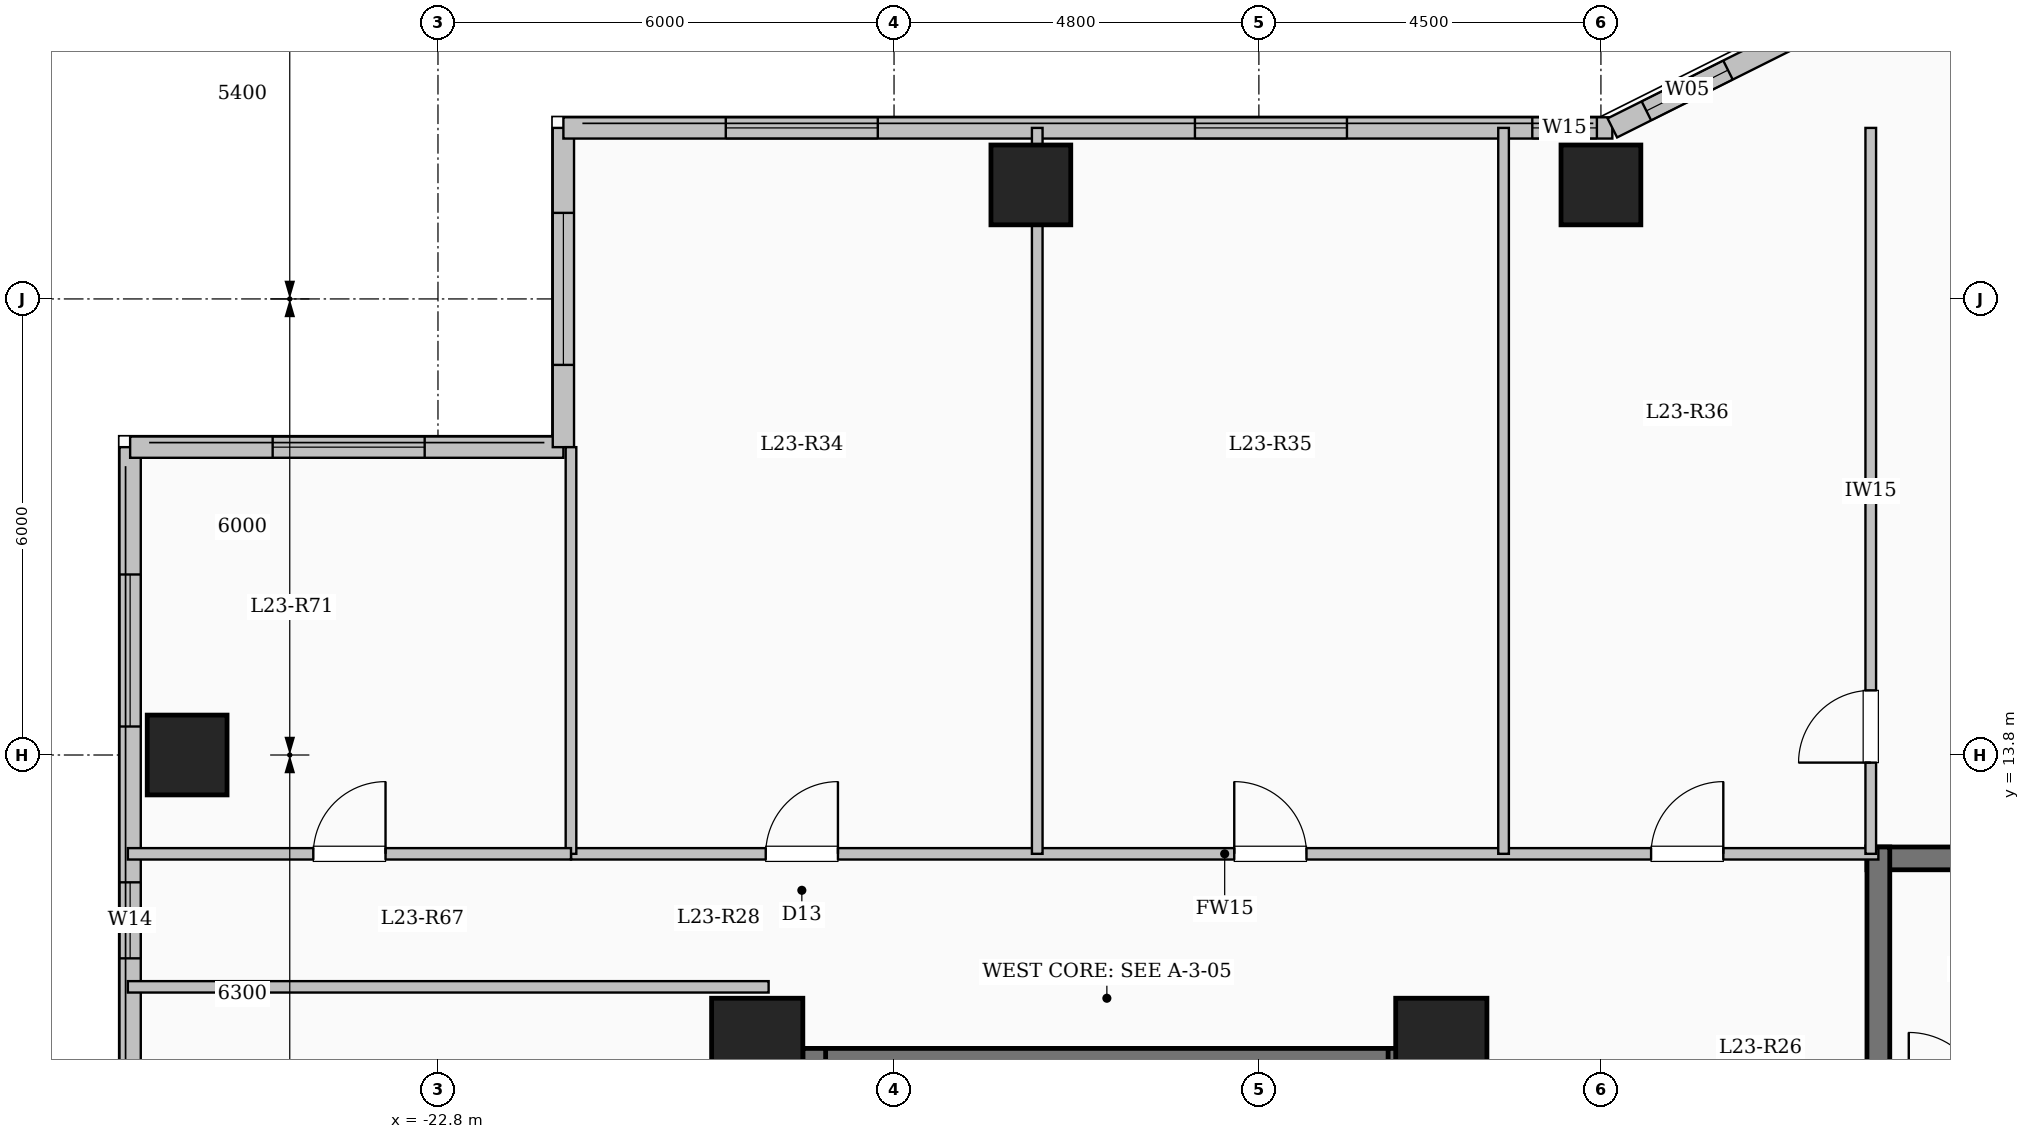
"""IFC4 building model, lengths in metres.
Left out: names, types, materials, properties, quantities, classifications, styles, units other than length and angle.
Written with IfcOpenShell. Run it as: python <this file> out.ifc"""

import sys

from ifc_helpers import new_model, si_unit, direction, frame, frame_2d, origin, origin_2d, place, context, subcontext, project, spatial, rectangle, extrude, element, fill, save


model = new_model("IFC4")
c1 = context("Model", 3, precision=1e-05, world=origin(), true_north=direction((0.0, 1.0)))
c2 = subcontext(c1, "Body", "Model", "MODEL_VIEW")
j1 = project(units=[si_unit("LENGTHUNIT", "METRE"), si_unit("PLANEANGLEUNIT", "RADIAN")], contexts=[c1])
p1 = place(None, origin())
s1 = spatial("IfcSite", under=j1, at=p1, CompositionType="ELEMENT")
p2 = place(p1, origin())
s2 = spatial("IfcBuilding", under=s1, at=p2, CompositionType="ELEMENT")
p3 = place(p2, frame((0.0, 0.0, 88.35)))
s3 = spatial("IfcBuildingStorey", under=s2, at=p3, CompositionType="ELEMENT", Elevation=88.35)
for number, where, z_axis, x_axis in (
    (1, (-9.6, 10.0, 0.0), (0.0, 0.0, 1.0), (1.0, 0.0, 0.0)),
    (2, (-18.6, 10.0, 0.0), (0.0, 0.0, 1.0), (1.0, 0.0, 0.0)),
):
    element("IfcColumn", number, at=place(p3, frame(where, z_axis=z_axis, x_axis=x_axis)), inside=s3, PredefinedType="COLUMN", context=c2, shape_type="SweptSolid", body=[
        extrude(rectangle(XDim=1.2, YDim=1.2, at=origin_2d()), origin(), (0.0, 0.0, 1.0), 3.35),
    ])
for number, where, z_axis, x_axis in (
    (3, (-15.0, 21.3, 0.0), (0.0, 0.0, 1.0), (1.0, 0.0, 0.0)),
    (4, (-7.5, 21.3, 0.0), (0.0, 0.0, 1.0), (1.0, 0.0, 0.0)),
    (5, (-26.1, 13.8, 0.0), (0.0, 0.0, 1.0), (1.0, 0.0, 0.0)),
):
    element("IfcColumn", number, at=place(p3, frame(where, z_axis=z_axis, x_axis=x_axis)), inside=s3, PredefinedType="COLUMN", context=c2, shape_type="SweptSolid", body=[
        extrude(rectangle(XDim=1.05, YDim=1.05, at=origin_2d()), origin(), (0.0, 0.0, 1.0), 3.35),
    ])
p4 = place(p3, frame((-26.85, -17.85, 0.0), z_axis=(0.0, 0.0, 1.0), x_axis=(0.0, 1.0, 0.0)))
e6 = element("IfcWall", 6, at=p4, inside=s3, PredefinedType="SOLIDWALL", context=c2, shape_type="SweptSolid", body=[
    extrude(rectangle(XDim=35.7, YDim=0.28, at=frame_2d((17.85, 0.0))), origin(), (0.0, 0.0, 1.0), 3.1),
])
p5 = place(p4, frame((2.55, 0.0, 0.9)))
e7 = element("IfcOpeningElement", 7, at=p5, cuts=e6, PredefinedType="OPENING", context=c2, shape_type="SweptSolid", body=[
    extrude(rectangle(XDim=2.4, YDim=1.8, at=frame_2d((1.2, 0.9))), frame((0.0, 0.15, 0.0), z_axis=(0.0, -1.0, 0.0), x_axis=(1.0, 0.0, 0.0)), (0.0, 0.0, 1.0), 0.3),
])
p6 = place(p4, frame((8.343, 0.0, 0.9)))
e8 = element("IfcOpeningElement", 8, at=p6, cuts=e6, PredefinedType="OPENING", context=c2, shape_type="SweptSolid", body=[
    extrude(rectangle(XDim=1.5, YDim=1.65, at=frame_2d((0.75, 0.825))), frame((0.0, 0.15, 0.0), z_axis=(0.0, -1.0, 0.0), x_axis=(1.0, 0.0, 0.0)), (0.0, 0.0, 1.0), 0.3),
])
p7 = place(p4, frame((18.6, 0.0, 0.9)))
e9 = element("IfcOpeningElement", 9, at=p7, cuts=e6, PredefinedType="OPENING", context=c2, shape_type="SweptSolid", body=[
    extrude(rectangle(XDim=2.0, YDim=1.7, at=frame_2d((1.0, 0.85))), frame((0.0, 0.15, 0.0), z_axis=(0.0, -1.0, 0.0), x_axis=(1.0, 0.0, 0.0)), (0.0, 0.0, 1.0), 0.3),
])
p8 = place(p4, frame((28.975, 0.0, 0.95)))
e10 = element("IfcOpeningElement", 10, at=p8, cuts=e6, PredefinedType="OPENING", context=c2, shape_type="SweptSolid", body=[
    extrude(rectangle(XDim=1.0, YDim=1.5, at=frame_2d((0.5, 0.75))), frame((0.0, 0.15, 0.0), z_axis=(0.0, -1.0, 0.0), x_axis=(1.0, 0.0, 0.0)), (0.0, 0.0, 1.0), 0.3),
])
p9 = place(p4, frame((32.025, 0.0, 0.9)))
e11 = element("IfcOpeningElement", 11, at=p9, cuts=e6, PredefinedType="OPENING", context=c2, shape_type="SweptSolid", body=[
    extrude(rectangle(XDim=2.0, YDim=1.7, at=frame_2d((1.0, 0.85))), frame((0.0, 0.15, 0.0), z_axis=(0.0, -1.0, 0.0), x_axis=(1.0, 0.0, 0.0)), (0.0, 0.0, 1.0), 0.3),
])
p10 = place(p3, frame((-26.85, 17.85, 0.0), z_axis=(0.0, 0.0, 1.0), x_axis=(1.0, 0.0, 0.0)))
e12 = element("IfcWall", 12, at=p10, inside=s3, PredefinedType="SOLIDWALL", context=c2, shape_type="SweptSolid", body=[
    extrude(rectangle(XDim=5.7, YDim=0.28, at=frame_2d((2.85, 0.0))), origin(), (0.0, 0.0, 1.0), 3.1),
])
p11 = place(p10, frame((1.875, 0.0, 0.9)))
e13 = element("IfcOpeningElement", 13, at=p11, cuts=e12, PredefinedType="OPENING", context=c2, shape_type="SweptSolid", body=[
    extrude(rectangle(XDim=2.0, YDim=1.7, at=frame_2d((1.0, 0.85))), frame((0.0, 0.15, 0.0), z_axis=(0.0, -1.0, 0.0), x_axis=(1.0, 0.0, 0.0)), (0.0, 0.0, 1.0), 0.3),
])
p12 = place(p3, frame((-21.15, 17.85, 0.0), z_axis=(0.0, 0.0, 1.0), x_axis=(0.0, 1.0, 0.0)))
e14 = element("IfcWall", 14, at=p12, inside=s3, PredefinedType="SOLIDWALL", context=c2, shape_type="SweptSolid", body=[
    extrude(rectangle(XDim=4.2, YDim=0.28, at=frame_2d((2.1, 0.0))), origin(), (0.0, 0.0, 1.0), 3.1),
])
p13 = place(p12, frame((1.082, 0.0, 0.9)))
e15 = element("IfcOpeningElement", 15, at=p13, cuts=e14, PredefinedType="OPENING", context=c2, shape_type="SweptSolid", body=[
    extrude(rectangle(XDim=2.0, YDim=1.7, at=frame_2d((1.0, 0.85))), frame((0.0, 0.15, 0.0), z_axis=(0.0, -1.0, 0.0), x_axis=(1.0, 0.0, 0.0)), (0.0, 0.0, 1.0), 0.3),
])
p14 = place(p3, frame((-21.15, 22.05, 0.0), z_axis=(0.0, 0.0, 1.0), x_axis=(1.0, 0.0, 0.0)))
e16 = element("IfcWall", 16, at=p14, inside=s3, PredefinedType="SOLIDWALL", context=c2, shape_type="SweptSolid", body=[
    extrude(rectangle(XDim=13.8, YDim=0.28, at=frame_2d((6.9, 0.0))), origin(), (0.0, 0.0, 1.0), 3.1),
])
p15 = place(p14, frame((2.136, 0.0, 0.9)))
e17 = element("IfcOpeningElement", 17, at=p15, cuts=e16, PredefinedType="OPENING", context=c2, shape_type="SweptSolid", body=[
    extrude(rectangle(XDim=2.0, YDim=1.7, at=frame_2d((1.0, 0.85))), frame((0.0, 0.15, 0.0), z_axis=(0.0, -1.0, 0.0), x_axis=(1.0, 0.0, 0.0)), (0.0, 0.0, 1.0), 0.3),
])
p16 = place(p14, frame((8.309, 0.0, 0.9)))
e18 = element("IfcOpeningElement", 18, at=p16, cuts=e16, PredefinedType="OPENING", context=c2, shape_type="SweptSolid", body=[
    extrude(rectangle(XDim=2.0, YDim=1.7, at=frame_2d((1.0, 0.85))), frame((0.0, 0.15, 0.0), z_axis=(0.0, -1.0, 0.0), x_axis=(1.0, 0.0, 0.0)), (0.0, 0.0, 1.0), 0.3),
])
p17 = place(p14, frame((12.747, 0.0, 0.95)))
e19 = element("IfcOpeningElement", 19, at=p17, cuts=e16, PredefinedType="OPENING", context=c2, shape_type="SweptSolid", body=[
    extrude(rectangle(XDim=0.85, YDim=1.5, at=frame_2d((0.425, 0.75))), frame((0.0, 0.15, 0.0), z_axis=(0.0, -1.0, 0.0), x_axis=(1.0, 0.0, 0.0)), (0.0, 0.0, 1.0), 0.3),
])
p18 = place(p3, frame((-7.35, 22.05, 0.0), z_axis=(0.0, 0.0, 1.0), x_axis=(0.894427191, 0.4472135955, 0.0)))
e20 = element("IfcWall", 20, at=p18, inside=s3, PredefinedType="SOLIDWALL", context=c2, shape_type="SweptSolid", body=[
    extrude(rectangle(XDim=3.354, YDim=0.28, at=frame_2d((1.677, 0.0))), origin(), (0.0, 0.0, 1.0), 3.1),
])
p19 = place(p18, frame((0.501, 0.0, 0.95)))
e21 = element("IfcOpeningElement", 21, at=p19, cuts=e20, PredefinedType="OPENING", context=c2, shape_type="SweptSolid", body=[
    extrude(rectangle(XDim=1.2, YDim=1.5, at=frame_2d((0.6, 0.75))), frame((0.0, 0.15, 0.0), z_axis=(0.0, -1.0, 0.0), x_axis=(1.0, 0.0, 0.0)), (0.0, 0.0, 1.0), 0.3),
])
p20 = place(p3, frame((-18.0, 9.79, 0.0), z_axis=(0.0, 0.0, 1.0), x_axis=(1.0, 0.0, 0.0)))
e22 = element("IfcWall", 22, at=p20, inside=s3, PredefinedType="SHEAR", context=c2, shape_type="SweptSolid", body=[
    extrude(rectangle(XDim=8.0, YDim=0.3, at=frame_2d((4.0, 0.0))), origin(), (0.0, 0.0, 1.0), 3.35),
])
for number, where, z_axis, x_axis in (
    (23, (-17.85, 6.35, 0.0), (0.0, 0.0, 1.0), (0.0, 1.0, 0.0)),
    (24, (-10.15, 6.35, 0.0), (0.0, 0.0, 1.0), (0.0, 1.0, 0.0)),
):
    element("IfcWall", number, at=place(p3, frame(where, z_axis=z_axis, x_axis=x_axis)), inside=s3, PredefinedType="SHEAR", context=c2, shape_type="SweptSolid", body=[
        extrude(rectangle(XDim=3.59, YDim=0.3, at=frame_2d((1.795, 0.0))), origin(), (0.0, 0.0, 1.0), 3.35),
    ])
p21 = place(p3, frame((-4.0, 12.44, 0.0), z_axis=(0.0, 0.0, 1.0), x_axis=(1.0, 0.0, 0.0)))
e25 = element("IfcWall", 25, at=p21, inside=s3, PredefinedType="SHEAR", context=c2, shape_type="SweptSolid", body=[
    extrude(rectangle(XDim=8.0, YDim=0.3, at=frame_2d((4.0, 0.0))), origin(), (0.0, 0.0, 1.0), 3.35),
])
p22 = place(p3, frame((-3.85, 9.0, 0.0), z_axis=(0.0, 0.0, 1.0), x_axis=(0.0, 1.0, 0.0)))
e26 = element("IfcWall", 26, at=p22, inside=s3, PredefinedType="SHEAR", context=c2, shape_type="SweptSolid", body=[
    extrude(rectangle(XDim=3.59, YDim=0.3, at=frame_2d((1.795, 0.0))), origin(), (0.0, 0.0, 1.0), 3.35),
])
p23 = place(p3, frame((-21.05, 12.5, 0.0), z_axis=(0.0, 0.0, 1.0), x_axis=(1.0, 0.0, 0.0)))
e27 = element("IfcWall", 27, at=p23, inside=s3, PredefinedType="PARTITIONING", context=c2, shape_type="SweptSolid", body=[
    extrude(rectangle(XDim=17.2, YDim=0.15, at=frame_2d((8.6, 0.0))), origin(), (0.0, 0.0, 1.0), 3.1),
])
p24 = place(p23, frame((2.562, 0.0, 0.0)))
e28 = element("IfcOpeningElement", 28, at=p24, cuts=e27, PredefinedType="OPENING", context=c2, shape_type="SweptSolid", body=[
    extrude(rectangle(XDim=0.95, YDim=2.15, at=frame_2d((0.475, 1.075))), frame((0.0, 0.085, 0.0), z_axis=(0.0, -1.0, 0.0), x_axis=(1.0, 0.0, 0.0)), (0.0, 0.0, 1.0), 0.17),
])
p25 = place(p23, frame((8.726, 0.0, 0.0)))
e29 = element("IfcOpeningElement", 29, at=p25, cuts=e27, PredefinedType="OPENING", context=c2, shape_type="SweptSolid", body=[
    extrude(rectangle(XDim=0.95, YDim=2.15, at=frame_2d((0.475, 1.075))), frame((0.0, 0.085, 0.0), z_axis=(0.0, -1.0, 0.0), x_axis=(1.0, 0.0, 0.0)), (0.0, 0.0, 1.0), 0.17),
])
p26 = place(p23, frame((14.21, 0.0, 0.0)))
e30 = element("IfcOpeningElement", 30, at=p26, cuts=e27, PredefinedType="OPENING", context=c2, shape_type="SweptSolid", body=[
    extrude(rectangle(XDim=0.95, YDim=2.15, at=frame_2d((0.475, 1.075))), frame((0.0, 0.085, 0.0), z_axis=(0.0, -1.0, 0.0), x_axis=(1.0, 0.0, 0.0)), (0.0, 0.0, 1.0), 0.17),
])
p27 = place(p3, frame((-3.95, 12.5, 0.0), z_axis=(0.0, 0.0, 1.0), x_axis=(0.0, 1.0, 0.0)))
e31 = element("IfcWall", 31, at=p27, inside=s3, PredefinedType="PARTITIONING", context=c2, shape_type="SweptSolid", body=[
    extrude(rectangle(XDim=9.55, YDim=0.14, at=frame_2d((4.775, 0.0))), origin(), (0.0, 0.0, 1.0), 3.1),
])
p28 = place(p27, frame((1.2, 0.0, 0.0)))
e32 = element("IfcOpeningElement", 32, at=p28, cuts=e31, PredefinedType="OPENING", context=c2, shape_type="SweptSolid", body=[
    extrude(rectangle(XDim=0.95, YDim=2.15, at=frame_2d((0.475, 1.075))), frame((0.0, 0.08, 0.0), z_axis=(0.0, -1.0, 0.0), x_axis=(1.0, 0.0, 0.0)), (0.0, 0.0, 1.0), 0.16),
])
p29 = place(p3, frame((-14.916, 12.5, 0.0), z_axis=(0.0, 0.0, 1.0), x_axis=(0.0, 1.0, 0.0)))
e33 = element("IfcWall", 33, at=p29, inside=s3, PredefinedType="PARTITIONING", context=c2, shape_type="SweptSolid", body=[
    extrude(rectangle(XDim=9.55, YDim=0.14, at=frame_2d((4.775, 0.0))), origin(), (0.0, 0.0, 1.0), 2.435),
])
p30 = place(p3, frame((-8.781, 12.5, 0.0), z_axis=(0.0, 0.0, 1.0), x_axis=(0.0, 1.0, 0.0)))
e34 = element("IfcWall", 34, at=p30, inside=s3, PredefinedType="PARTITIONING", context=c2, shape_type="SweptSolid", body=[
    extrude(rectangle(XDim=9.55, YDim=0.14, at=frame_2d((4.775, 0.0))), origin(), (0.0, 0.0, 1.0), 3.1),
])
p31 = place(p3, frame((-26.88, 10.75, 0.0), z_axis=(0.0, 0.0, 1.0), x_axis=(1.0, 0.0, 0.0)))
e35 = element("IfcWall", 35, at=p31, inside=s3, PredefinedType="PARTITIONING", context=c2, shape_type="SweptSolid", body=[
    extrude(rectangle(XDim=8.43, YDim=0.15, at=frame_2d((4.215, 0.0))), origin(), (0.0, 0.0, 1.0), 3.1),
])
p32 = place(p3, frame((-21.05, 12.5, 0.0), z_axis=(0.0, 0.0, 1.0), x_axis=(0.0, 1.0, 0.0)))
e36 = element("IfcWall", 36, at=p32, inside=s3, PredefinedType="PARTITIONING", context=c2, shape_type="SweptSolid", body=[
    extrude(rectangle(XDim=5.35, YDim=0.14, at=frame_2d((2.675, 0.0))), origin(), (0.0, 0.0, 1.0), 3.1),
])
p33 = place(p3, frame((-26.88, 12.5, 0.0), z_axis=(0.0, 0.0, 1.0), x_axis=(1.0, 0.0, 0.0)))
e37 = element("IfcWall", 37, at=p33, inside=s3, PredefinedType="PARTITIONING", context=c2, shape_type="SweptSolid", body=[
    extrude(rectangle(XDim=5.83, YDim=0.15, at=frame_2d((2.915, 0.0))), origin(), (0.0, 0.0, 1.0), 3.1),
])
p34 = place(p33, frame((2.44, 0.0, 0.0)))
e38 = element("IfcOpeningElement", 38, at=p34, cuts=e37, PredefinedType="OPENING", context=c2, shape_type="SweptSolid", body=[
    extrude(rectangle(XDim=0.95, YDim=2.15, at=frame_2d((0.475, 1.075))), frame((0.0, 0.085, 0.0), z_axis=(0.0, -1.0, 0.0), x_axis=(1.0, 0.0, 0.0)), (0.0, 0.0, 1.0), 0.17),
])
p35 = place(p8, origin())
e39 = element("IfcWindow", 39, at=p35, inside=s3, PartitioningType="SINGLE_PANEL", PredefinedType="WINDOW", context=c2, shape_type="SweptSolid", body=[
    extrude(rectangle(XDim=1.0, YDim=1.5, at=frame_2d((0.5, 0.75))), frame((0.0, 0.03, 0.0), z_axis=(0.0, -1.0, 0.0), x_axis=(1.0, 0.0, 0.0)), (0.0, 0.0, 1.0), 0.06),
])
fill(e10, e39)
p36 = place(p9, origin())
e40 = element("IfcWindow", 40, at=p36, inside=s3, PartitioningType="SINGLE_PANEL", PredefinedType="WINDOW", context=c2, shape_type="SweptSolid", body=[
    extrude(rectangle(XDim=2.0, YDim=1.7, at=frame_2d((1.0, 0.85))), frame((0.0, 0.03, 0.0), z_axis=(0.0, -1.0, 0.0), x_axis=(1.0, 0.0, 0.0)), (0.0, 0.0, 1.0), 0.06),
])
fill(e11, e40)
p37 = place(p11, origin())
e41 = element("IfcWindow", 41, at=p37, inside=s3, PartitioningType="SINGLE_PANEL", PredefinedType="WINDOW", context=c2, shape_type="SweptSolid", body=[
    extrude(rectangle(XDim=2.0, YDim=1.7, at=frame_2d((1.0, 0.85))), frame((0.0, 0.03, 0.0), z_axis=(0.0, -1.0, 0.0), x_axis=(1.0, 0.0, 0.0)), (0.0, 0.0, 1.0), 0.06),
])
fill(e13, e41)
p38 = place(p13, origin())
e42 = element("IfcWindow", 42, at=p38, inside=s3, PartitioningType="SINGLE_PANEL", PredefinedType="WINDOW", context=c2, shape_type="SweptSolid", body=[
    extrude(rectangle(XDim=2.0, YDim=1.7, at=frame_2d((1.0, 0.85))), frame((0.0, 0.03, 0.0), z_axis=(0.0, -1.0, 0.0), x_axis=(1.0, 0.0, 0.0)), (0.0, 0.0, 1.0), 0.06),
])
fill(e15, e42)
p39 = place(p15, origin())
e43 = element("IfcWindow", 43, at=p39, inside=s3, PartitioningType="SINGLE_PANEL", PredefinedType="WINDOW", context=c2, shape_type="SweptSolid", body=[
    extrude(rectangle(XDim=2.0, YDim=1.7, at=frame_2d((1.0, 0.85))), frame((0.0, 0.03, 0.0), z_axis=(0.0, -1.0, 0.0), x_axis=(1.0, 0.0, 0.0)), (0.0, 0.0, 1.0), 0.06),
])
fill(e17, e43)
p40 = place(p16, origin())
e44 = element("IfcWindow", 44, at=p40, inside=s3, PartitioningType="SINGLE_PANEL", PredefinedType="WINDOW", context=c2, shape_type="SweptSolid", body=[
    extrude(rectangle(XDim=2.0, YDim=1.7, at=frame_2d((1.0, 0.85))), frame((0.0, 0.03, 0.0), z_axis=(0.0, -1.0, 0.0), x_axis=(1.0, 0.0, 0.0)), (0.0, 0.0, 1.0), 0.06),
])
fill(e18, e44)
p41 = place(p17, origin())
e45 = element("IfcWindow", 45, at=p41, inside=s3, PartitioningType="SINGLE_PANEL", PredefinedType="WINDOW", context=c2, shape_type="SweptSolid", body=[
    extrude(rectangle(XDim=0.85, YDim=1.5, at=frame_2d((0.425, 0.75))), frame((0.0, 0.03, 0.0), z_axis=(0.0, -1.0, 0.0), x_axis=(1.0, 0.0, 0.0)), (0.0, 0.0, 1.0), 0.06),
])
fill(e19, e45)
p42 = place(p19, origin())
e46 = element("IfcWindow", 46, at=p42, inside=s3, PartitioningType="SINGLE_PANEL", PredefinedType="WINDOW", context=c2, shape_type="SweptSolid", body=[
    extrude(rectangle(XDim=1.2, YDim=1.5, at=frame_2d((0.6, 0.75))), frame((0.0, 0.03, 0.0), z_axis=(0.0, -1.0, 0.0), x_axis=(1.0, 0.0, 0.0)), (0.0, 0.0, 1.0), 0.06),
])
fill(e21, e46)
p43 = place(p24, origin())
e47 = element("IfcDoor", 47, at=p43, inside=s3, OperationType="SINGLE_SWING_RIGHT", PredefinedType="DOOR", context=c2, shape_type="SweptSolid", body=[
    extrude(rectangle(XDim=0.95, YDim=2.15, at=frame_2d((0.475, 1.075))), frame((0.0, 0.025, 0.0), z_axis=(0.0, -1.0, 0.0), x_axis=(1.0, 0.0, 0.0)), (0.0, 0.0, 1.0), 0.05),
])
fill(e28, e47)
p44 = place(p25, origin())
e48 = element("IfcDoor", 48, at=p44, inside=s3, OperationType="SINGLE_SWING_LEFT", PredefinedType="DOOR", context=c2, shape_type="SweptSolid", body=[
    extrude(rectangle(XDim=0.95, YDim=2.15, at=frame_2d((0.475, 1.075))), frame((0.0, 0.025, 0.0), z_axis=(0.0, -1.0, 0.0), x_axis=(1.0, 0.0, 0.0)), (0.0, 0.0, 1.0), 0.05),
])
fill(e29, e48)
p45 = place(p26, origin())
e49 = element("IfcDoor", 49, at=p45, inside=s3, OperationType="SINGLE_SWING_RIGHT", PredefinedType="DOOR", context=c2, shape_type="SweptSolid", body=[
    extrude(rectangle(XDim=0.95, YDim=2.15, at=frame_2d((0.475, 1.075))), frame((0.0, 0.025, 0.0), z_axis=(0.0, -1.0, 0.0), x_axis=(1.0, 0.0, 0.0)), (0.0, 0.0, 1.0), 0.05),
])
fill(e30, e49)
p46 = place(p28, origin())
e50 = element("IfcDoor", 50, at=p46, inside=s3, OperationType="SINGLE_SWING_LEFT", PredefinedType="DOOR", context=c2, shape_type="SweptSolid", body=[
    extrude(rectangle(XDim=0.95, YDim=2.15, at=frame_2d((0.475, 1.075))), frame((0.0, 0.025, 0.0), z_axis=(0.0, -1.0, 0.0), x_axis=(1.0, 0.0, 0.0)), (0.0, 0.0, 1.0), 0.05),
])
fill(e32, e50)
p47 = place(p34, origin())
e51 = element("IfcDoor", 51, at=p47, inside=s3, OperationType="SINGLE_SWING_RIGHT", PredefinedType="DOOR", context=c2, shape_type="SweptSolid", body=[
    extrude(rectangle(XDim=0.95, YDim=2.15, at=frame_2d((0.475, 1.075))), frame((0.0, 0.025, 0.0), z_axis=(0.0, -1.0, 0.0), x_axis=(1.0, 0.0, 0.0)), (0.0, 0.0, 1.0), 0.05),
])
fill(e38, e51)
save(model, sys.argv[1])
